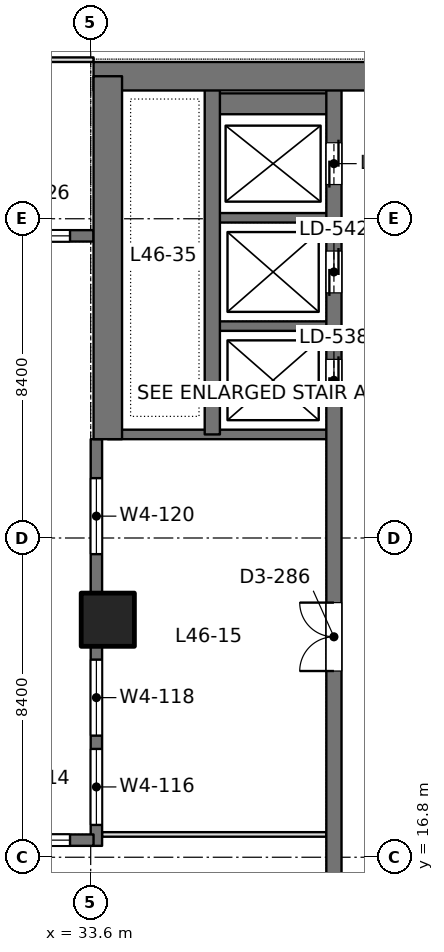
"""IFC4 building model, lengths in metres.
Left out: names, types, materials, properties, quantities, classifications, styles, units other than length and angle.
Written with IfcOpenShell. Run it as: python <this file> out.ifc"""

import sys

from ifc_helpers import new_model, si_unit, direction, frame, frame_2d, origin, origin_2d, place, context, subcontext, project, spatial, rectangle, extrude, element, fill, save


model = new_model("IFC4")
c1 = context("Model", 3, precision=1e-05, world=origin(), true_north=direction((0.0, 1.0)))
c2 = subcontext(c1, "Body", "Model", "MODEL_VIEW")
j1 = project(units=[si_unit("LENGTHUNIT", "METRE"), si_unit("PLANEANGLEUNIT", "RADIAN")], contexts=[c1])
p1 = place(None, origin())
s1 = spatial("IfcSite", under=j1, at=p1, CompositionType="ELEMENT")
p2 = place(p1, origin())
s2 = spatial("IfcBuilding", under=s1, at=p2, CompositionType="ELEMENT")
p3 = place(p2, frame((0.0, 0.0, 202.8)))
s3 = spatial("IfcBuildingStorey", under=s2, at=p3, CompositionType="ELEMENT", Elevation=202.8)
p4 = place(p3, frame((34.05, 23.05, 0.0), z_axis=(0.0, 0.0, 1.0), x_axis=(1.0, 0.0, 0.0)))
e1 = element("IfcColumn", 1, at=p4, inside=s3, PredefinedType="COLUMN", context=c2, shape_type="SweptSolid", body=[
    extrude(rectangle(XDim=1.4, YDim=1.4, at=origin_2d()), origin(), (0.0, 0.0, 1.0), 4.2),
])
p5 = place(p3, frame((33.675, 37.35, 0.0), z_axis=(0.0, 0.0, 1.0), x_axis=(1.0, 0.0, 0.0)))
e2 = element("IfcWall", 2, at=p5, inside=s3, PredefinedType="SHEAR", context=c2, shape_type="SweptSolid", body=[
    extrude(rectangle(XDim=17.85, YDim=0.75, at=frame_2d((8.925, 0.0))), origin(), (0.0, 0.0, 1.0), 4.2),
])
p6 = place(p5, frame((7.175, 0.0, 0.0)))
e3 = element("IfcOpeningElement", 3, at=p6, cuts=e2, PredefinedType="OPENING", context=c2, shape_type="SweptSolid", body=[
    extrude(rectangle(XDim=1.8, YDim=2.4, at=frame_2d((0.9, 1.2))), frame((0.0, 0.385, 0.0), z_axis=(0.0, -1.0, 0.0), x_axis=(1.0, 0.0, 0.0)), (0.0, 0.0, 1.0), 0.77),
])
p7 = place(p3, frame((34.05, 27.8, 0.0), z_axis=(0.0, 0.0, 1.0), x_axis=(0.0, 1.0, 0.0)))
e4 = element("IfcWall", 4, at=p7, inside=s3, PredefinedType="SHEAR", context=c2, shape_type="SweptSolid", body=[
    extrude(rectangle(XDim=9.55, YDim=0.75, at=frame_2d((4.775, 0.0))), origin(), (0.0, 0.0, 1.0), 4.2),
])
p8 = place(p3, frame((40.0, 13.05, 0.0), z_axis=(0.0, 0.0, 1.0), x_axis=(0.0, 1.0, 0.0)))
e5 = element("IfcWall", 5, at=p8, inside=s3, PredefinedType="SHEAR", context=c2, shape_type="SweptSolid", body=[
    extrude(rectangle(XDim=24.3, YDim=0.4, at=frame_2d((12.15, 0.0))), origin(), (0.0, 0.0, 1.0), 4.2),
])
p9 = place(p8, frame((15.75, 0.0, 0.0)))
e6 = element("IfcOpeningElement", 6, at=p9, cuts=e5, PredefinedType="OPENING", context=c2, shape_type="SweptSolid", body=[
    extrude(rectangle(XDim=1.1, YDim=2.2, at=frame_2d((0.55, 1.1))), frame((0.0, 0.21, 0.0), z_axis=(0.0, -1.0, 0.0), x_axis=(1.0, 0.0, 0.0)), (0.0, 0.0, 1.0), 0.42),
])
p10 = place(p8, frame((18.6, 0.0, 0.0)))
e7 = element("IfcOpeningElement", 7, at=p10, cuts=e5, PredefinedType="OPENING", context=c2, shape_type="SweptSolid", body=[
    extrude(rectangle(XDim=1.1, YDim=2.2, at=frame_2d((0.55, 1.1))), frame((0.0, 0.21, 0.0), z_axis=(0.0, -1.0, 0.0), x_axis=(1.0, 0.0, 0.0)), (0.0, 0.0, 1.0), 0.42),
])
p11 = place(p8, frame((21.45, 0.0, 0.0)))
e8 = element("IfcOpeningElement", 8, at=p11, cuts=e5, PredefinedType="OPENING", context=c2, shape_type="SweptSolid", body=[
    extrude(rectangle(XDim=1.1, YDim=2.2, at=frame_2d((0.55, 1.1))), frame((0.0, 0.21, 0.0), z_axis=(0.0, -1.0, 0.0), x_axis=(1.0, 0.0, 0.0)), (0.0, 0.0, 1.0), 0.42),
])
p12 = place(p8, frame((8.65, 0.0, 0.0)))
e9 = element("IfcOpeningElement", 9, at=p12, cuts=e5, PredefinedType="OPENING", context=c2, shape_type="SweptSolid", body=[
    extrude(rectangle(XDim=1.8, YDim=2.4, at=frame_2d((0.9, 1.2))), frame((0.0, 0.21, 0.0), z_axis=(0.0, -1.0, 0.0), x_axis=(1.0, 0.0, 0.0)), (0.0, 0.0, 1.0), 0.42),
])
p13 = place(p3, frame((36.8, 27.925, 0.0), z_axis=(0.0, 0.0, 1.0), x_axis=(0.0, 1.0, 0.0)))
e10 = element("IfcWall", 10, at=p13, inside=s3, PredefinedType="SHEAR", context=c2, shape_type="SweptSolid", body=[
    extrude(rectangle(XDim=9.425, YDim=0.4, at=frame_2d((4.712, 0.0))), origin(), (0.0, 0.0, 1.0), 4.2),
])
p14 = place(p3, frame((40.0, 27.925, 0.0), z_axis=(0.0, 0.0, 1.0), x_axis=(-1.0, 0.0, 0.0)))
e11 = element("IfcWall", 11, at=p14, inside=s3, PredefinedType="SHEAR", context=c2, shape_type="SweptSolid", body=[
    extrude(rectangle(XDim=5.95, YDim=0.25, at=frame_2d((2.975, 0.0))), origin(), (0.0, 0.0, 1.0), 4.2),
])
for number, where, z_axis, x_axis in (
    (12, (40.0, 30.775, 0.0), (0.0, 0.0, 1.0), (-1.0, 0.0, 0.0)),
    (13, (40.0, 33.625, 0.0), (0.0, 0.0, 1.0), (-1.0, 0.0, 0.0)),
):
    element("IfcWall", number, at=place(p3, frame(where, z_axis=z_axis, x_axis=x_axis)), inside=s3, PredefinedType="SHEAR", context=c2, shape_type="SweptSolid", body=[
        extrude(rectangle(XDim=3.2, YDim=0.25, at=frame_2d((1.6, 0.0))), origin(), (0.0, 0.0, 1.0), 4.2),
    ])
p15 = place(p3, frame((40.0, 36.625, 0.0), z_axis=(0.0, 0.0, 1.0), x_axis=(-1.0, 0.0, 0.0)))
e14 = element("IfcWall", 14, at=p15, inside=s3, PredefinedType="SHEAR", context=c2, shape_type="SweptSolid", body=[
    extrude(rectangle(XDim=3.2, YDim=0.55, at=frame_2d((1.6, 0.0))), origin(), (0.0, 0.0, 1.0), 4.2),
])
p16 = place(p3, frame((33.75, 17.1, 0.0), z_axis=(0.0, 0.0, 1.0), x_axis=(0.0, 1.0, 0.0)))
e15 = element("IfcWall", 15, at=p16, inside=s3, PredefinedType="SOLIDWALL", context=c2, shape_type="SweptSolid", body=[
    extrude(rectangle(XDim=10.7, YDim=0.3, at=frame_2d((5.35, 0.0))), origin(), (0.0, 0.0, 1.0), 4.05),
])
p17 = place(p16, frame((0.55, 0.0, 0.9)))
e16 = element("IfcOpeningElement", 16, at=p17, cuts=e15, PredefinedType="OPENING", context=c2, shape_type="SweptSolid", body=[
    extrude(rectangle(XDim=2.0, YDim=1.9, at=frame_2d((1.0, 0.95))), frame((0.0, 0.16, 0.0), z_axis=(0.0, -1.0, 0.0), x_axis=(1.0, 0.0, 0.0)), (0.0, 0.0, 1.0), 0.32),
])
p18 = place(p16, frame((2.9, 0.0, 0.9)))
e17 = element("IfcOpeningElement", 17, at=p18, cuts=e15, PredefinedType="OPENING", context=c2, shape_type="SweptSolid", body=[
    extrude(rectangle(XDim=2.0, YDim=1.9, at=frame_2d((1.0, 0.95))), frame((0.0, 0.16, 0.0), z_axis=(0.0, -1.0, 0.0), x_axis=(1.0, 0.0, 0.0)), (0.0, 0.0, 1.0), 0.32),
])
p19 = place(p16, frame((7.675, 0.0, 0.9)))
e18 = element("IfcOpeningElement", 18, at=p19, cuts=e15, PredefinedType="OPENING", context=c2, shape_type="SweptSolid", body=[
    extrude(rectangle(XDim=2.0, YDim=1.9, at=frame_2d((1.0, 0.95))), frame((0.0, 0.16, 0.0), z_axis=(0.0, -1.0, 0.0), x_axis=(1.0, 0.0, 0.0)), (0.0, 0.0, 1.0), 0.32),
])
p20 = place(p3, frame((25.75, 17.25, 0.0), z_axis=(0.0, 0.0, 1.0), x_axis=(1.0, 0.0, 0.0)))
e19 = element("IfcWall", 19, at=p20, inside=s3, PredefinedType="SOLIDWALL", context=c2, shape_type="SweptSolid", body=[
    extrude(rectangle(XDim=7.925, YDim=0.3, at=frame_2d((3.962, 0.0))), origin(), (0.0, 0.0, 1.0), 4.05),
])
p21 = place(p20, frame((0.069, 0.0, 0.9)))
e20 = element("IfcOpeningElement", 20, at=p21, cuts=e19, PredefinedType="OPENING", context=c2, shape_type="SweptSolid", body=[
    extrude(rectangle(XDim=2.0, YDim=1.9, at=frame_2d((1.0, 0.95))), frame((0.0, 0.16, 0.0), z_axis=(0.0, -1.0, 0.0), x_axis=(1.0, 0.0, 0.0)), (0.0, 0.0, 1.0), 0.32),
])
p22 = place(p20, frame((2.688, 0.0, 0.9)))
e21 = element("IfcOpeningElement", 21, at=p22, cuts=e19, PredefinedType="OPENING", context=c2, shape_type="SweptSolid", body=[
    extrude(rectangle(XDim=2.0, YDim=1.9, at=frame_2d((1.0, 0.95))), frame((0.0, 0.16, 0.0), z_axis=(0.0, -1.0, 0.0), x_axis=(1.0, 0.0, 0.0)), (0.0, 0.0, 1.0), 0.32),
])
p23 = place(p20, frame((5.306, 0.0, 0.9)))
e22 = element("IfcOpeningElement", 22, at=p23, cuts=e19, PredefinedType="OPENING", context=c2, shape_type="SweptSolid", body=[
    extrude(rectangle(XDim=2.0, YDim=1.9, at=frame_2d((1.0, 0.95))), frame((0.0, 0.16, 0.0), z_axis=(0.0, -1.0, 0.0), x_axis=(1.0, 0.0, 0.0)), (0.0, 0.0, 1.0), 0.32),
])
p24 = place(p3, frame((25.75, 33.15, 0.0), z_axis=(0.0, 0.0, 1.0), x_axis=(1.0, 0.0, 0.0)))
e23 = element("IfcWall", 23, at=p24, inside=s3, PredefinedType="SOLIDWALL", context=c2, shape_type="SweptSolid", body=[
    extrude(rectangle(XDim=7.925, YDim=0.3, at=frame_2d((3.962, 0.0))), origin(), (0.0, 0.0, 1.0), 4.05),
])
p25 = place(p24, frame((0.069, 0.0, 0.9)))
e24 = element("IfcOpeningElement", 24, at=p25, cuts=e23, PredefinedType="OPENING", context=c2, shape_type="SweptSolid", body=[
    extrude(rectangle(XDim=2.0, YDim=1.9, at=frame_2d((1.0, 0.95))), frame((0.0, 0.16, 0.0), z_axis=(0.0, -1.0, 0.0), x_axis=(1.0, 0.0, 0.0)), (0.0, 0.0, 1.0), 0.32),
])
p26 = place(p24, frame((2.688, 0.0, 0.9)))
e25 = element("IfcOpeningElement", 25, at=p26, cuts=e23, PredefinedType="OPENING", context=c2, shape_type="SweptSolid", body=[
    extrude(rectangle(XDim=2.0, YDim=1.9, at=frame_2d((1.0, 0.95))), frame((0.0, 0.16, 0.0), z_axis=(0.0, -1.0, 0.0), x_axis=(1.0, 0.0, 0.0)), (0.0, 0.0, 1.0), 0.32),
])
p27 = place(p24, frame((5.306, 0.0, 0.9)))
e26 = element("IfcOpeningElement", 26, at=p27, cuts=e23, PredefinedType="OPENING", context=c2, shape_type="SweptSolid", body=[
    extrude(rectangle(XDim=2.0, YDim=1.9, at=frame_2d((1.0, 0.95))), frame((0.0, 0.16, 0.0), z_axis=(0.0, -1.0, 0.0), x_axis=(1.0, 0.0, 0.0)), (0.0, 0.0, 1.0), 0.32),
])
p28 = place(p3, frame((33.898, 17.4, 0.0), z_axis=(0.0, 0.0, 1.0), x_axis=(1.0, 0.0, 0.0)))
e27 = element("IfcWall", 27, at=p28, inside=s3, PredefinedType="PARTITIONING", context=c2, shape_type="SweptSolid", body=[
    extrude(rectangle(XDim=5.904, YDim=0.12, at=frame_2d((2.952, 0.0))), origin(), (0.0, 0.0, 1.0), 3.55),
])
p29 = place(p3, frame((16.725, 37.785, 0.0), z_axis=(0.0, 0.0, 1.0), x_axis=(1.0, 0.0, 0.0)))
e28 = element("IfcWall", 28, at=p29, inside=s3, PredefinedType="PARTITIONING", context=c2, shape_type="SweptSolid", body=[
    extrude(rectangle(XDim=16.95, YDim=0.12, at=frame_2d((8.475, 0.0))), origin(), (0.0, 0.0, 1.0), 3.55),
])
p30 = place(p29, frame((7.575, 0.0, 0.0)))
e29 = element("IfcOpeningElement", 29, at=p30, cuts=e28, PredefinedType="OPENING", context=c2, shape_type="SweptSolid", body=[
    extrude(rectangle(XDim=1.8, YDim=2.2, at=frame_2d((0.9, 1.1))), frame((0.0, 0.07, 0.0), z_axis=(0.0, -1.0, 0.0), x_axis=(1.0, 0.0, 0.0)), (0.0, 0.0, 1.0), 0.14),
])
p31 = place(p17, origin())
e30 = element("IfcWindow", 30, at=p31, inside=s3, PartitioningType="SINGLE_PANEL", PredefinedType="WINDOW", context=c2, shape_type="SweptSolid", body=[
    extrude(rectangle(XDim=2.0, YDim=1.9, at=frame_2d((1.0, 0.95))), frame((0.0, 0.03, 0.0), z_axis=(0.0, -1.0, 0.0), x_axis=(1.0, 0.0, 0.0)), (0.0, 0.0, 1.0), 0.06),
])
fill(e16, e30)
p32 = place(p18, origin())
e31 = element("IfcWindow", 31, at=p32, inside=s3, PartitioningType="SINGLE_PANEL", PredefinedType="WINDOW", context=c2, shape_type="SweptSolid", body=[
    extrude(rectangle(XDim=2.0, YDim=1.9, at=frame_2d((1.0, 0.95))), frame((0.0, 0.03, 0.0), z_axis=(0.0, -1.0, 0.0), x_axis=(1.0, 0.0, 0.0)), (0.0, 0.0, 1.0), 0.06),
])
fill(e17, e31)
p33 = place(p19, origin())
e32 = element("IfcWindow", 32, at=p33, inside=s3, PartitioningType="SINGLE_PANEL", PredefinedType="WINDOW", context=c2, shape_type="SweptSolid", body=[
    extrude(rectangle(XDim=2.0, YDim=1.9, at=frame_2d((1.0, 0.95))), frame((0.0, 0.03, 0.0), z_axis=(0.0, -1.0, 0.0), x_axis=(1.0, 0.0, 0.0)), (0.0, 0.0, 1.0), 0.06),
])
fill(e18, e32)
p34 = place(p23, origin())
e33 = element("IfcWindow", 33, at=p34, inside=s3, PartitioningType="SINGLE_PANEL", PredefinedType="WINDOW", context=c2, shape_type="SweptSolid", body=[
    extrude(rectangle(XDim=2.0, YDim=1.9, at=frame_2d((1.0, 0.95))), frame((0.0, 0.03, 0.0), z_axis=(0.0, -1.0, 0.0), x_axis=(1.0, 0.0, 0.0)), (0.0, 0.0, 1.0), 0.06),
])
fill(e22, e33)
p35 = place(p27, origin())
e34 = element("IfcWindow", 34, at=p35, inside=s3, PartitioningType="SINGLE_PANEL", PredefinedType="WINDOW", context=c2, shape_type="SweptSolid", body=[
    extrude(rectangle(XDim=2.0, YDim=1.9, at=frame_2d((1.0, 0.95))), frame((0.0, 0.03, 0.0), z_axis=(0.0, -1.0, 0.0), x_axis=(1.0, 0.0, 0.0)), (0.0, 0.0, 1.0), 0.06),
])
fill(e26, e34)
p36 = place(p9, origin())
e35 = element("IfcDoor", 35, at=p36, inside=s3, OperationType="DOUBLE_DOOR_SLIDING", PredefinedType="DOOR", context=c2, shape_type="SweptSolid", body=[
    extrude(rectangle(XDim=1.1, YDim=2.2, at=frame_2d((0.55, 1.1))), frame((0.0, 0.025, 0.0), z_axis=(0.0, -1.0, 0.0), x_axis=(1.0, 0.0, 0.0)), (0.0, 0.0, 1.0), 0.05),
])
fill(e6, e35)
p37 = place(p10, origin())
e36 = element("IfcDoor", 36, at=p37, inside=s3, OperationType="DOUBLE_DOOR_SLIDING", PredefinedType="DOOR", context=c2, shape_type="SweptSolid", body=[
    extrude(rectangle(XDim=1.1, YDim=2.2, at=frame_2d((0.55, 1.1))), frame((0.0, 0.025, 0.0), z_axis=(0.0, -1.0, 0.0), x_axis=(1.0, 0.0, 0.0)), (0.0, 0.0, 1.0), 0.05),
])
fill(e7, e36)
p38 = place(p11, origin())
e37 = element("IfcDoor", 37, at=p38, inside=s3, OperationType="DOUBLE_DOOR_SLIDING", PredefinedType="DOOR", context=c2, shape_type="SweptSolid", body=[
    extrude(rectangle(XDim=1.1, YDim=2.2, at=frame_2d((0.55, 1.1))), frame((0.0, 0.025, 0.0), z_axis=(0.0, -1.0, 0.0), x_axis=(1.0, 0.0, 0.0)), (0.0, 0.0, 1.0), 0.05),
])
fill(e8, e37)
p39 = place(p12, origin())
e38 = element("IfcDoor", 38, at=p39, inside=s3, OperationType="DOUBLE_DOOR_SINGLE_SWING", PredefinedType="DOOR", context=c2, shape_type="SweptSolid", body=[
    extrude(rectangle(XDim=1.8, YDim=2.4, at=frame_2d((0.9, 1.2))), frame((0.0, 0.025, 0.0), z_axis=(0.0, -1.0, 0.0), x_axis=(1.0, 0.0, 0.0)), (0.0, 0.0, 1.0), 0.05),
])
fill(e9, e38)
save(model, sys.argv[1])
